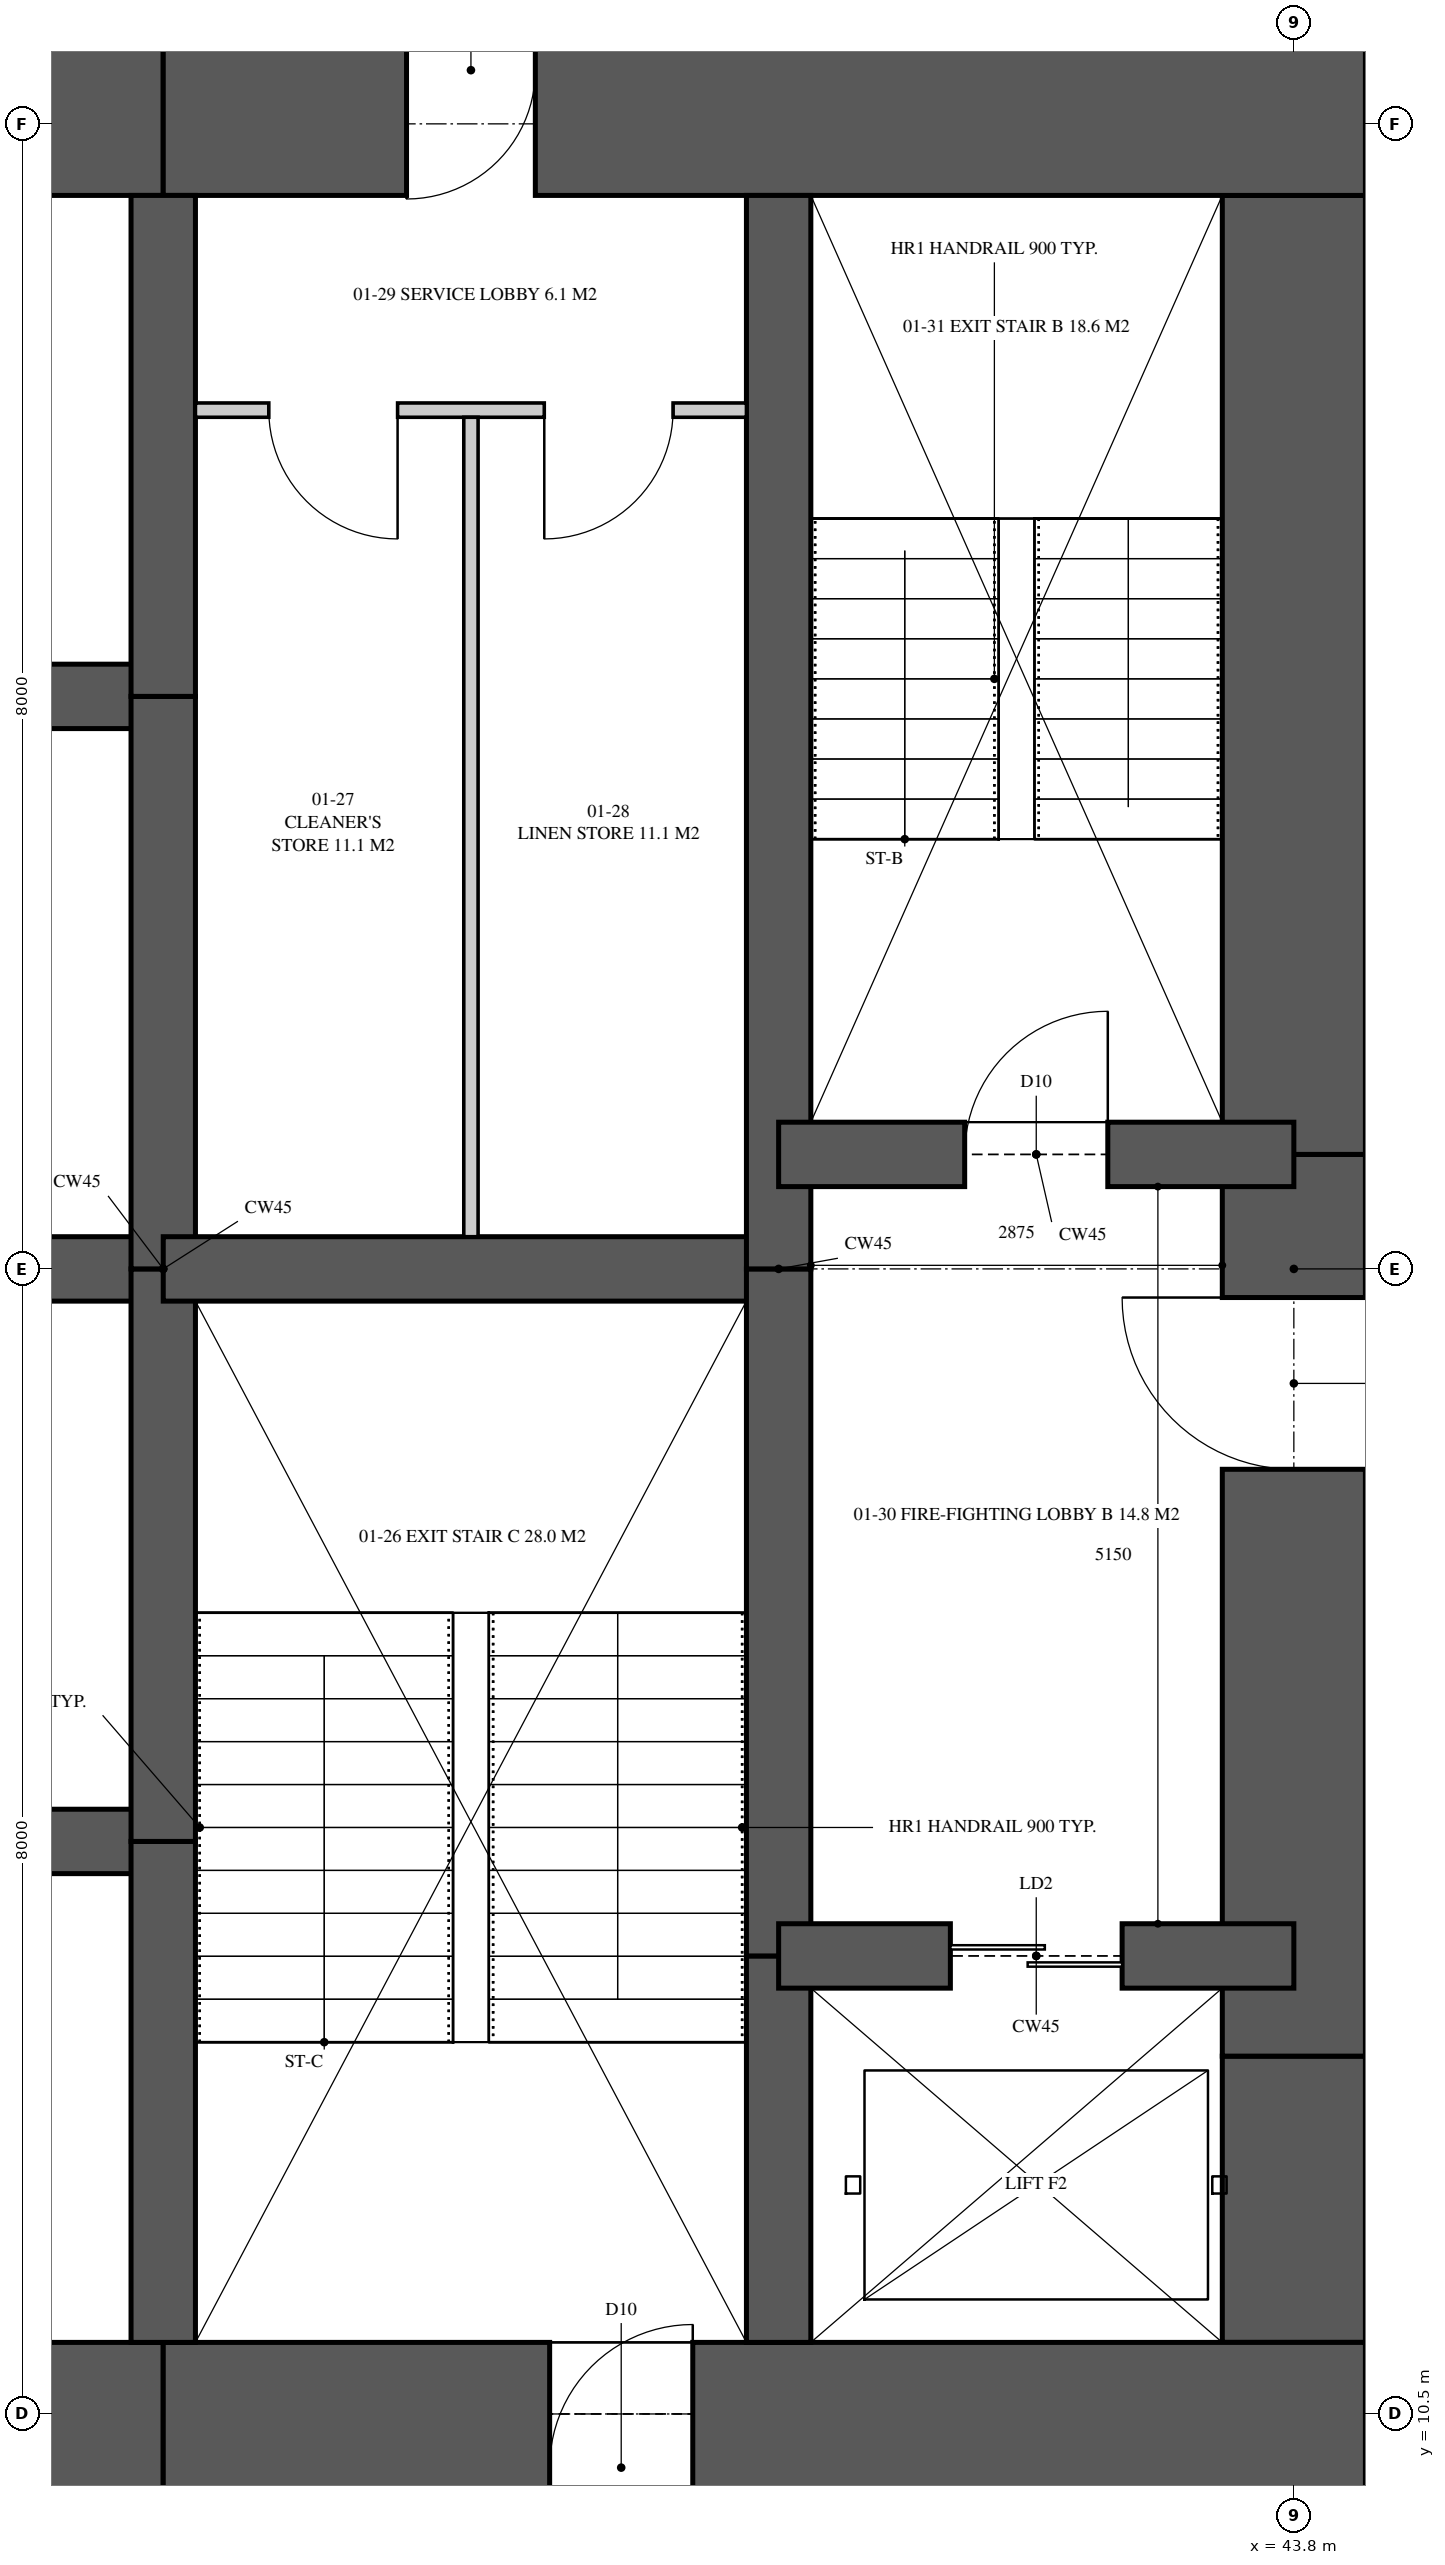
"""IFC4 building model, lengths in metres.
Left out: names, types, materials, properties, quantities, classifications, styles, units other than length and angle.
Written with IfcOpenShell. Run it as: python <this file> out.ifc"""

import sys

from ifc_helpers import new_model, si_unit, direction, frame, frame_2d, origin, place, context, subcontext, project, spatial, rectangle, extrude, element, fill, save


model = new_model("IFC4")
c1 = context("Model", 3, precision=1e-05, world=origin(), true_north=direction((0.0, 1.0)))
c2 = subcontext(c1, "Body", "Model", "MODEL_VIEW")
j1 = project(units=[si_unit("LENGTHUNIT", "METRE"), si_unit("PLANEANGLEUNIT", "RADIAN")], contexts=[c1])
p1 = place(None, origin())
s1 = spatial("IfcSite", under=j1, at=p1, CompositionType="ELEMENT")
p2 = place(p1, origin())
s2 = spatial("IfcBuilding", under=s1, at=p2, CompositionType="ELEMENT")
p3 = place(p2, frame((0.0, 0.0, 6.0)))
s3 = spatial("IfcBuildingStorey", under=s2, at=p3, CompositionType="ELEMENT", Elevation=6.0)
p4 = place(p3, frame((31.6, 10.125, 0.0), z_axis=(0.0, 0.0, 1.0), x_axis=(1.0, 0.0, 0.0)))
e1 = element("IfcWall", 1, at=p4, inside=s3, PredefinedType="SHEAR", context=c2, shape_type="SweptSolid", body=[
    extrude(rectangle(XDim=4.3, YDim=1.75, at=frame_2d((2.15, 0.0))), origin(), (0.0, 0.0, 1.0), 5.0),
])
p5 = place(p3, frame((35.9, 10.125, 0.0), z_axis=(0.0, 0.0, 1.0), x_axis=(1.0, 0.0, 0.0)))
e2 = element("IfcWall", 2, at=p5, inside=s3, PredefinedType="SHEAR", context=c2, shape_type="SweptSolid", body=[
    extrude(rectangle(XDim=8.4, YDim=1.75, at=frame_2d((4.2, 0.0))), origin(), (0.0, 0.0, 1.0), 5.0),
])
p6 = place(p5, frame((2.7, 0.0, 0.0)))
e3 = element("IfcOpeningElement", 3, at=p6, cuts=e2, PredefinedType="OPENING", context=c2, shape_type="SweptSolid", body=[
    extrude(rectangle(XDim=1.0, YDim=2.1, at=frame_2d((0.5, 1.05))), frame((0.0, 0.885, 0.0), z_axis=(0.0, -1.0, 0.0), x_axis=(1.0, 0.0, 0.0)), (0.0, 0.0, 1.0), 1.77),
])
p7 = place(p3, frame((44.3, 26.875, 0.0), z_axis=(0.0, 0.0, 1.0), x_axis=(-1.0, 0.0, 0.0)))
e4 = element("IfcWall", 4, at=p7, inside=s3, PredefinedType="SHEAR", context=c2, shape_type="SweptSolid", body=[
    extrude(rectangle(XDim=8.4, YDim=1.75, at=frame_2d((4.2, 0.0))), origin(), (0.0, 0.0, 1.0), 5.0),
])
p8 = place(p7, frame((5.8, 0.0, 0.0)))
e5 = element("IfcOpeningElement", 5, at=p8, cuts=e4, PredefinedType="OPENING", context=c2, shape_type="SweptSolid", body=[
    extrude(rectangle(XDim=0.9, YDim=2.1, at=frame_2d((0.45, 1.05))), frame((0.0, 0.885, 0.0), z_axis=(0.0, -1.0, 0.0), x_axis=(1.0, 0.0, 0.0)), (0.0, 0.0, 1.0), 1.77),
])
p9 = place(p3, frame((35.9, 26.875, 0.0), z_axis=(0.0, 0.0, 1.0), x_axis=(-1.0, 0.0, 0.0)))
e6 = element("IfcWall", 6, at=p9, inside=s3, PredefinedType="SHEAR", context=c2, shape_type="SweptSolid", body=[
    extrude(rectangle(XDim=4.3, YDim=1.75, at=frame_2d((2.15, 0.0))), origin(), (0.0, 0.0, 1.0), 5.0),
])
p10 = place(p3, frame((43.8, 11.0, 0.0), z_axis=(0.0, 0.0, 1.0), x_axis=(0.0, 1.0, 0.0)))
e7 = element("IfcWall", 7, at=p10, inside=s3, PredefinedType="SHEAR", context=c2, shape_type="SweptSolid", body=[
    extrude(rectangle(XDim=2.0, YDim=1.0, at=frame_2d((1.0, 0.0))), origin(), (0.0, 0.0, 1.0), 5.0),
])
p11 = place(p3, frame((43.8, 13.0, 0.0), z_axis=(0.0, 0.0, 1.0), x_axis=(0.0, 1.0, 0.0)))
e8 = element("IfcWall", 8, at=p11, inside=s3, PredefinedType="SHEAR", context=c2, shape_type="SweptSolid", body=[
    extrude(rectangle(XDim=6.3, YDim=1.0, at=frame_2d((3.15, 0.0))), origin(), (0.0, 0.0, 1.0), 5.0),
])
p12 = place(p11, frame((4.1, 0.0, 0.0)))
e9 = element("IfcOpeningElement", 9, at=p12, cuts=e8, PredefinedType="OPENING", context=c2, shape_type="SweptSolid", body=[
    extrude(rectangle(XDim=1.2, YDim=2.2, at=frame_2d((0.6, 1.1))), frame((0.0, 0.51, 0.0), z_axis=(0.0, -1.0, 0.0), x_axis=(1.0, 0.0, 0.0)), (0.0, 0.0, 1.0), 1.02),
])
p13 = place(p3, frame((43.8, 19.3, 0.0), z_axis=(0.0, 0.0, 1.0), x_axis=(0.0, 1.0, 0.0)))
e10 = element("IfcWall", 10, at=p13, inside=s3, PredefinedType="SHEAR", context=c2, shape_type="SweptSolid", body=[
    extrude(rectangle(XDim=6.7, YDim=1.0, at=frame_2d((3.35, 0.0))), origin(), (0.0, 0.0, 1.0), 5.0),
])
p14 = place(p3, frame((35.9, 11.0, 0.0), z_axis=(0.0, 0.0, 1.0), x_axis=(0.0, 1.0, 0.0)))
e11 = element("IfcWall", 11, at=p14, inside=s3, PredefinedType="SHEAR", context=c2, shape_type="SweptSolid", body=[
    extrude(rectangle(XDim=3.5, YDim=0.45, at=frame_2d((1.75, 0.0))), origin(), (0.0, 0.0, 1.0), 5.0),
])
for number, where, z_axis, x_axis in (
    (12, (35.9, 14.5, 0.0), (0.0, 0.0, 1.0), (0.0, 1.0, 0.0)),
    (13, (35.9, 18.5, 0.0), (0.0, 0.0, 1.0), (0.0, 1.0, 0.0)),
):
    element("IfcWall", number, at=place(p3, frame(where, z_axis=z_axis, x_axis=x_axis)), inside=s3, PredefinedType="SHEAR", context=c2, shape_type="SweptSolid", body=[
        extrude(rectangle(XDim=4.0, YDim=0.45, at=frame_2d((2.0, 0.0))), origin(), (0.0, 0.0, 1.0), 5.0),
    ])
p15 = place(p3, frame((35.9, 22.5, 0.0), z_axis=(0.0, 0.0, 1.0), x_axis=(0.0, 1.0, 0.0)))
e14 = element("IfcWall", 14, at=p15, inside=s3, PredefinedType="SHEAR", context=c2, shape_type="SweptSolid", body=[
    extrude(rectangle(XDim=3.5, YDim=0.45, at=frame_2d((1.75, 0.0))), origin(), (0.0, 0.0, 1.0), 5.0),
])
p16 = place(p3, frame((40.2, 11.0, 0.0), z_axis=(0.0, 0.0, 1.0), x_axis=(0.0, 1.0, 0.0)))
e15 = element("IfcWall", 15, at=p16, inside=s3, PredefinedType="SHEAR", context=c2, shape_type="SweptSolid", body=[
    extrude(rectangle(XDim=2.7, YDim=0.45, at=frame_2d((1.35, 0.0))), origin(), (0.0, 0.0, 1.0), 5.0),
])
p17 = place(p3, frame((40.2, 13.7, 0.0), z_axis=(0.0, 0.0, 1.0), x_axis=(0.0, 1.0, 0.0)))
e16 = element("IfcWall", 16, at=p17, inside=s3, PredefinedType="SHEAR", context=c2, shape_type="SweptSolid", body=[
    extrude(rectangle(XDim=4.8, YDim=0.45, at=frame_2d((2.4, 0.0))), origin(), (0.0, 0.0, 1.0), 5.0),
])
p18 = place(p3, frame((40.2, 18.5, 0.0), z_axis=(0.0, 0.0, 1.0), x_axis=(0.0, 1.0, 0.0)))
e17 = element("IfcWall", 17, at=p18, inside=s3, PredefinedType="SHEAR", context=c2, shape_type="SweptSolid", body=[
    extrude(rectangle(XDim=7.5, YDim=0.45, at=frame_2d((3.75, 0.0))), origin(), (0.0, 0.0, 1.0), 5.0),
])
for number, where, z_axis, x_axis in (
    (18, (31.6, 14.5, 0.0), (0.0, 0.0, 1.0), (1.0, 0.0, 0.0)),
    (19, (31.6, 18.5, 0.0), (0.0, 0.0, 1.0), (1.0, 0.0, 0.0)),
    (20, (31.6, 22.5, 0.0), (0.0, 0.0, 1.0), (1.0, 0.0, 0.0)),
):
    element("IfcWall", number, at=place(p3, frame(where, z_axis=z_axis, x_axis=x_axis)), inside=s3, PredefinedType="SHEAR", context=c2, shape_type="SweptSolid", body=[
        extrude(rectangle(XDim=4.3, YDim=0.45, at=frame_2d((2.15, 0.0))), origin(), (0.0, 0.0, 1.0), 5.0),
    ])
p19 = place(p3, frame((35.9, 18.5, 0.0), z_axis=(0.0, 0.0, 1.0), x_axis=(1.0, 0.0, 0.0)))
e21 = element("IfcWall", 21, at=p19, inside=s3, PredefinedType="SHEAR", context=c2, shape_type="SweptSolid", body=[
    extrude(rectangle(XDim=4.3, YDim=0.45, at=frame_2d((2.15, 0.0))), origin(), (0.0, 0.0, 1.0), 5.0),
])
p20 = place(p3, frame((40.2, 13.7, 0.0), z_axis=(0.0, 0.0, 1.0), x_axis=(1.0, 0.0, 0.0)))
e22 = element("IfcWall", 22, at=p20, inside=s3, PredefinedType="SHEAR", context=c2, shape_type="SweptSolid", body=[
    extrude(rectangle(XDim=3.6, YDim=0.45, at=frame_2d((1.8, 0.0))), origin(), (0.0, 0.0, 1.0), 5.0),
])
p21 = place(p20, frame((1.2, 0.0, 0.0)))
e23 = element("IfcOpeningElement", 23, at=p21, cuts=e22, PredefinedType="OPENING", context=c2, shape_type="SweptSolid", body=[
    extrude(rectangle(XDim=1.2, YDim=2.1, at=frame_2d((0.6, 1.05))), frame((0.0, 0.235, 0.0), z_axis=(0.0, -1.0, 0.0), x_axis=(1.0, 0.0, 0.0)), (0.0, 0.0, 1.0), 0.47),
])
p22 = place(p3, frame((40.2, 19.3, 0.0), z_axis=(0.0, 0.0, 1.0), x_axis=(1.0, 0.0, 0.0)))
e24 = element("IfcWall", 24, at=p22, inside=s3, PredefinedType="SHEAR", context=c2, shape_type="SweptSolid", body=[
    extrude(rectangle(XDim=3.6, YDim=0.45, at=frame_2d((1.8, 0.0))), origin(), (0.0, 0.0, 1.0), 5.0),
])
p23 = place(p22, frame((1.3, 0.0, 0.0)))
e25 = element("IfcOpeningElement", 25, at=p23, cuts=e24, PredefinedType="OPENING", context=c2, shape_type="SweptSolid", body=[
    extrude(rectangle(XDim=1.0, YDim=2.1, at=frame_2d((0.5, 1.05))), frame((0.0, 0.235, 0.0), z_axis=(0.0, -1.0, 0.0), x_axis=(1.0, 0.0, 0.0)), (0.0, 0.0, 1.0), 0.47),
])
p24 = place(p3, frame((36.125, 24.5, 0.0), z_axis=(0.0, 0.0, 1.0), x_axis=(1.0, 0.0, 0.0)))
e26 = element("IfcWall", 26, at=p24, inside=s3, PredefinedType="PARTITIONING", context=c2, shape_type="SweptSolid", body=[
    extrude(rectangle(XDim=3.85, YDim=0.1, at=frame_2d((1.925, 0.0))), origin(), (0.0, 0.0, 1.0), 4.72),
])
p25 = place(p24, frame((0.512, 0.0, 0.0)))
e27 = element("IfcOpeningElement", 27, at=p25, cuts=e26, PredefinedType="OPENING", context=c2, shape_type="SweptSolid", body=[
    extrude(rectangle(XDim=0.9, YDim=2.1, at=frame_2d((0.45, 1.05))), frame((0.0, 0.06, 0.0), z_axis=(0.0, -1.0, 0.0), x_axis=(1.0, 0.0, 0.0)), (0.0, 0.0, 1.0), 0.12),
])
p26 = place(p24, frame((2.438, 0.0, 0.0)))
e28 = element("IfcOpeningElement", 28, at=p26, cuts=e26, PredefinedType="OPENING", context=c2, shape_type="SweptSolid", body=[
    extrude(rectangle(XDim=0.9, YDim=2.1, at=frame_2d((0.45, 1.05))), frame((0.0, 0.06, 0.0), z_axis=(0.0, -1.0, 0.0), x_axis=(1.0, 0.0, 0.0)), (0.0, 0.0, 1.0), 0.12),
])
p27 = place(p3, frame((38.05, 18.725, 0.0), z_axis=(0.0, 0.0, 1.0), x_axis=(0.0, 1.0, 0.0)))
e29 = element("IfcWall", 29, at=p27, inside=s3, PredefinedType="PARTITIONING", context=c2, shape_type="SweptSolid", body=[
    extrude(rectangle(XDim=5.725, YDim=0.1, at=frame_2d((2.862, 0.0))), origin(), (0.0, 0.0, 1.0), 4.72),
])
p28 = place(p25, frame((0.9, 0.0, 0.0), z_axis=(0.0, 0.0, 1.0), x_axis=(-1.0, 0.0, 0.0)))
e30 = element("IfcDoor", 30, at=p28, inside=s3, OperationType="SINGLE_SWING_LEFT", PredefinedType="DOOR", context=c2, shape_type="SweptSolid", body=[
    extrude(rectangle(XDim=0.9, YDim=2.1, at=frame_2d((0.45, 1.05))), frame((0.0, 0.025, 0.0), z_axis=(0.0, -1.0, 0.0), x_axis=(1.0, 0.0, 0.0)), (0.0, 0.0, 1.0), 0.05),
])
fill(e27, e30)
p29 = place(p26, frame((0.9, 0.0, 0.0), z_axis=(0.0, 0.0, 1.0), x_axis=(-1.0, 0.0, 0.0)))
e31 = element("IfcDoor", 31, at=p29, inside=s3, OperationType="SINGLE_SWING_RIGHT", PredefinedType="DOOR", context=c2, shape_type="SweptSolid", body=[
    extrude(rectangle(XDim=0.9, YDim=2.1, at=frame_2d((0.45, 1.05))), frame((0.0, 0.025, 0.0), z_axis=(0.0, -1.0, 0.0), x_axis=(1.0, 0.0, 0.0)), (0.0, 0.0, 1.0), 0.05),
])
fill(e28, e31)
p30 = place(p23, origin())
e32 = element("IfcDoor", 32, at=p30, inside=s3, OperationType="SINGLE_SWING_RIGHT", PredefinedType="DOOR", context=c2, shape_type="SweptSolid", body=[
    extrude(rectangle(XDim=1.0, YDim=2.1, at=frame_2d((0.5, 1.05))), frame((0.0, 0.025, 0.0), z_axis=(0.0, -1.0, 0.0), x_axis=(1.0, 0.0, 0.0)), (0.0, 0.0, 1.0), 0.05),
])
fill(e25, e32)
p31 = place(p12, origin())
e33 = element("IfcDoor", 33, at=p31, inside=s3, OperationType="SINGLE_SWING_RIGHT", PredefinedType="DOOR", context=c2, shape_type="SweptSolid", body=[
    extrude(rectangle(XDim=1.2, YDim=2.2, at=frame_2d((0.6, 1.1))), frame((0.0, 0.025, 0.0), z_axis=(0.0, -1.0, 0.0), x_axis=(1.0, 0.0, 0.0)), (0.0, 0.0, 1.0), 0.05),
])
fill(e9, e33)
p32 = place(p21, origin())
e34 = element("IfcDoor", 34, at=p32, inside=s3, OperationType="SLIDING_TO_LEFT", PredefinedType="DOOR", context=c2, shape_type="SweptSolid", body=[
    extrude(rectangle(XDim=1.2, YDim=2.1, at=frame_2d((0.6, 1.05))), frame((0.0, 0.025, 0.0), z_axis=(0.0, -1.0, 0.0), x_axis=(1.0, 0.0, 0.0)), (0.0, 0.0, 1.0), 0.05),
])
fill(e23, e34)
p33 = place(p6, origin())
e35 = element("IfcDoor", 35, at=p33, inside=s3, OperationType="SINGLE_SWING_RIGHT", PredefinedType="DOOR", context=c2, shape_type="SweptSolid", body=[
    extrude(rectangle(XDim=1.0, YDim=2.1, at=frame_2d((0.5, 1.05))), frame((0.0, 0.025, 0.0), z_axis=(0.0, -1.0, 0.0), x_axis=(1.0, 0.0, 0.0)), (0.0, 0.0, 1.0), 0.05),
])
fill(e3, e35)
p34 = place(p8, origin())
e36 = element("IfcDoor", 36, at=p34, inside=s3, OperationType="SINGLE_SWING_RIGHT", PredefinedType="DOOR", context=c2, shape_type="SweptSolid", body=[
    extrude(rectangle(XDim=0.9, YDim=2.1, at=frame_2d((0.45, 1.05))), frame((0.0, 0.47, 0.0), z_axis=(0.0, -1.0, 0.0), x_axis=(1.0, 0.0, 0.0)), (0.0, 0.0, 1.0), 0.8),
])
fill(e5, e36)
save(model, sys.argv[1])
